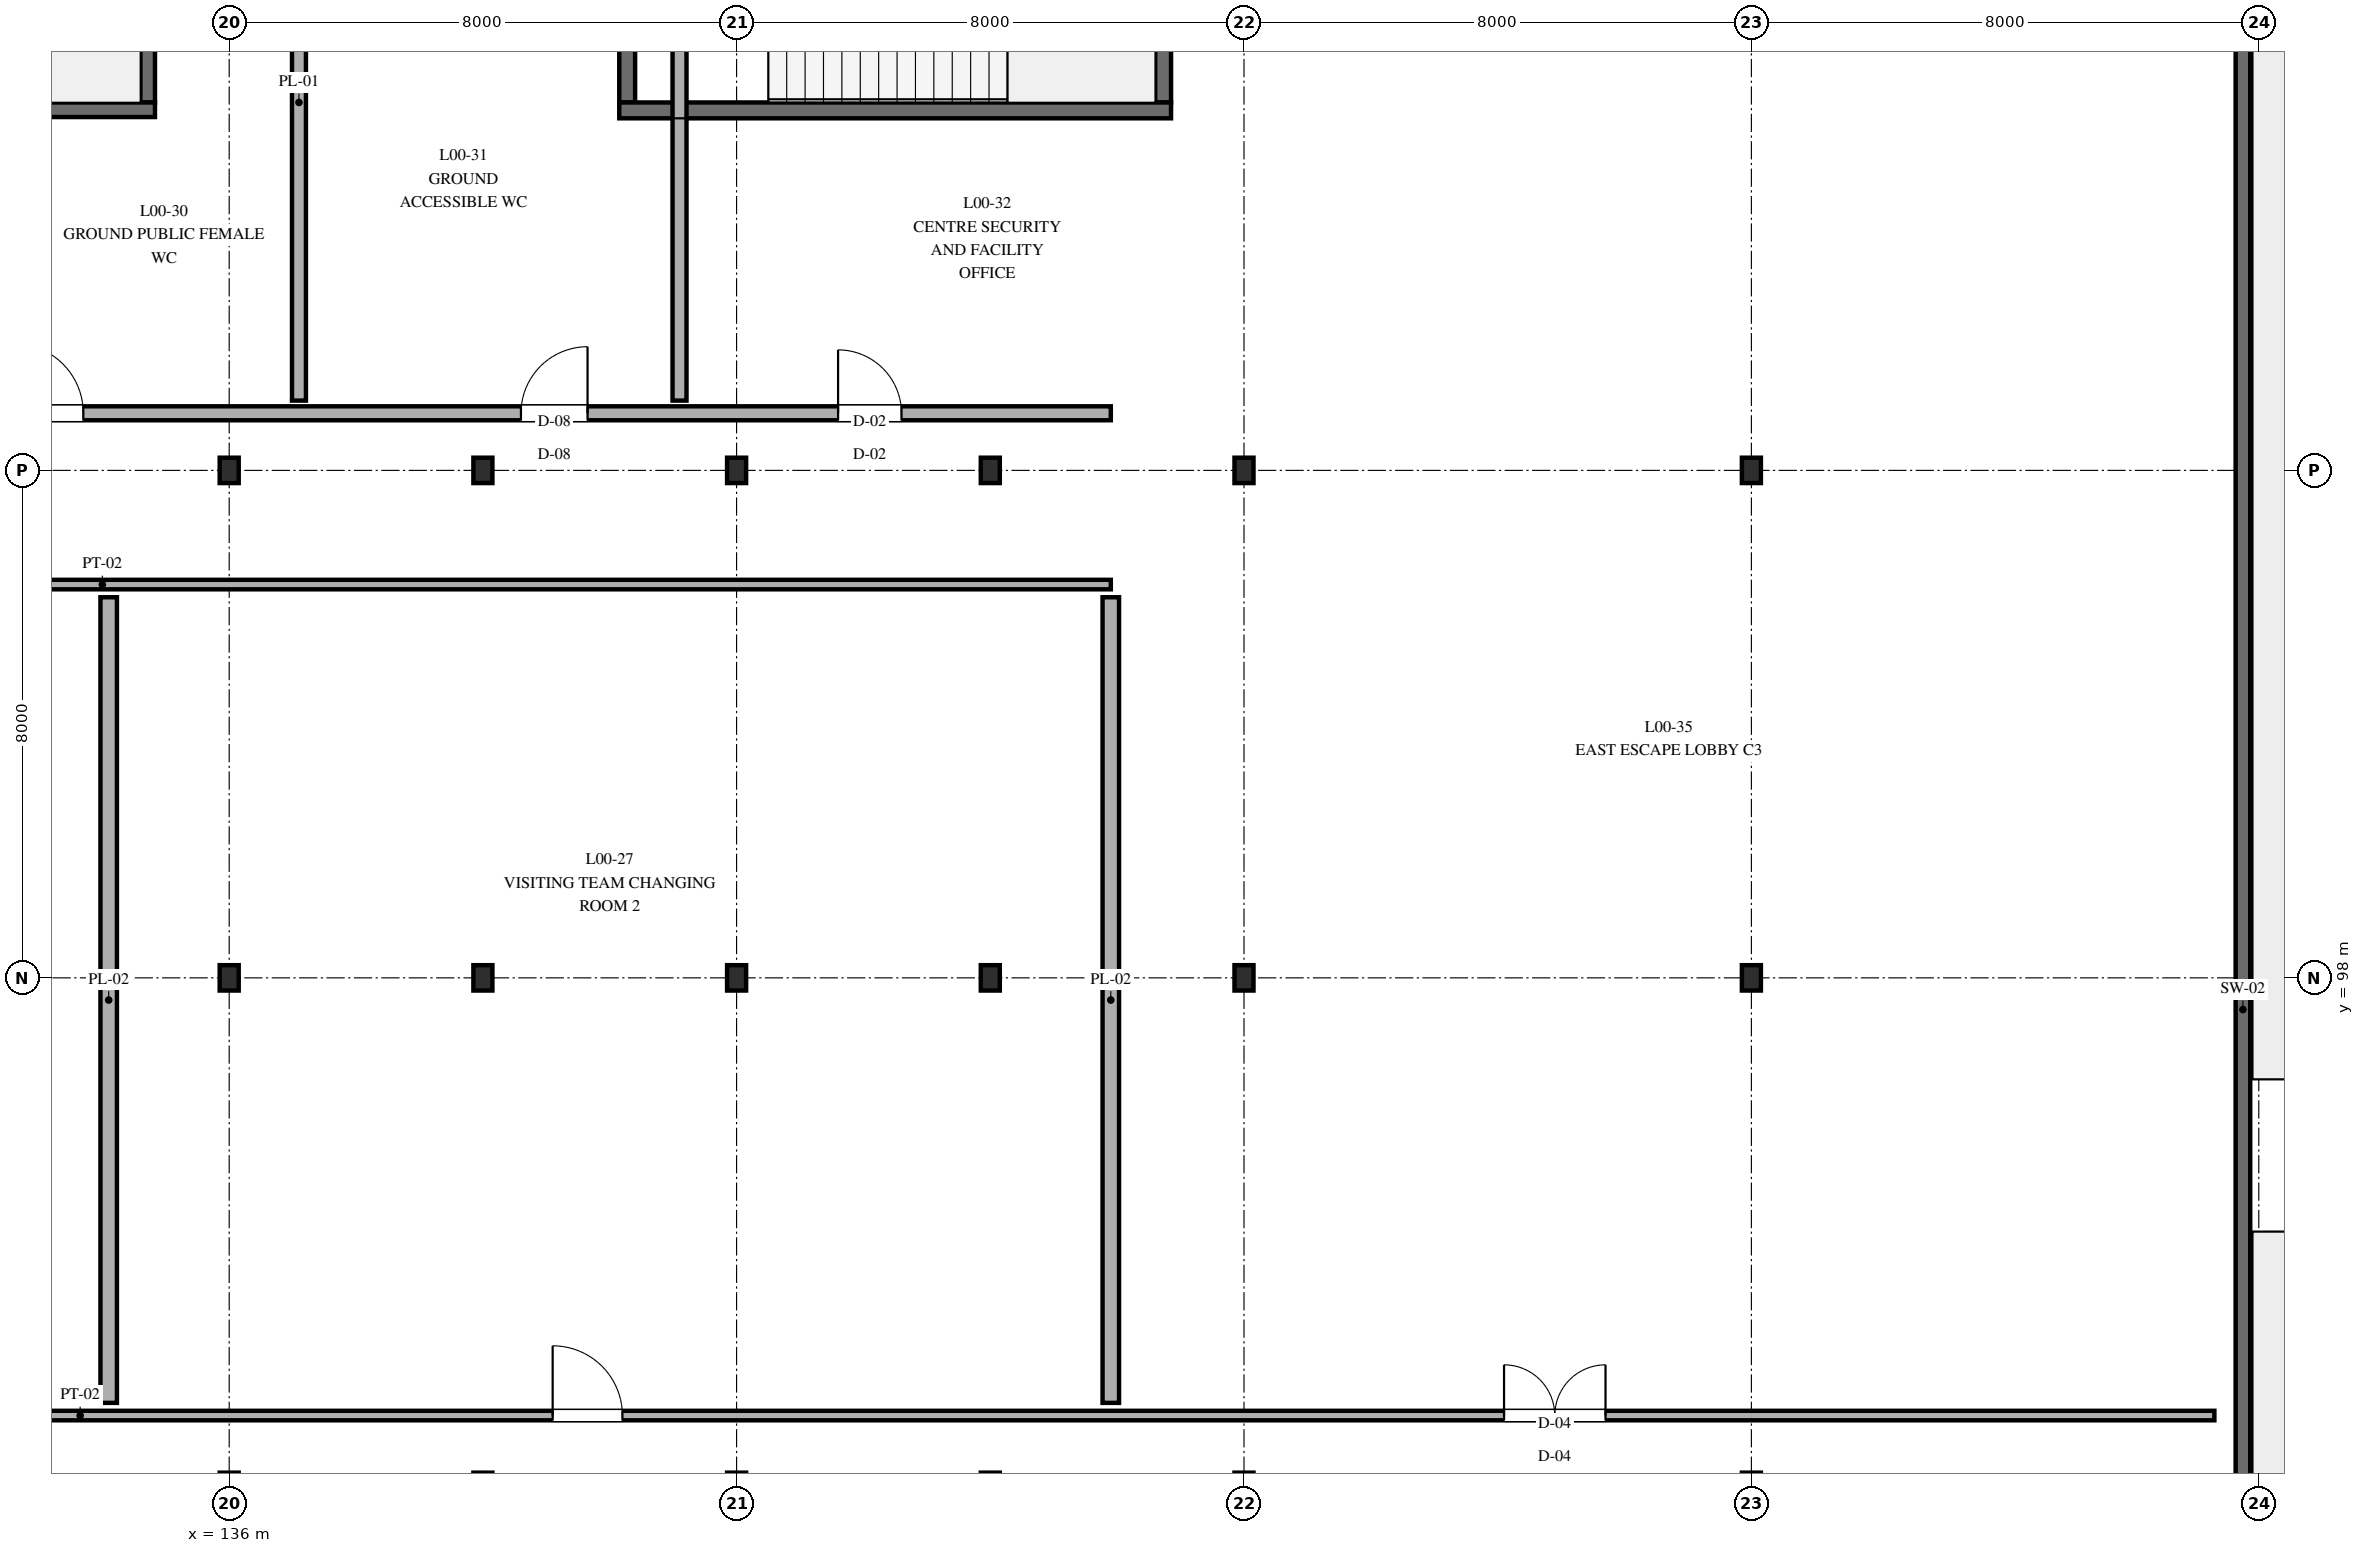
"""IFC4 building model, lengths in metres.
Left out: names, types, materials, properties, quantities, classifications, styles, units other than length and angle.
Written with IfcOpenShell. Run it as: python <this file> out.ifc"""

import sys

from ifc_helpers import new_model, si_unit, direction, frame, frame_2d, origin, origin_2d, place, context, subcontext, project, spatial, rectangle, i_section, extrude, element, fill, save


model = new_model("IFC4")
c1 = context("Model", 3, precision=1e-05, world=origin(), true_north=direction((0.0, 1.0)))
c2 = subcontext(c1, "Body", "Model", "MODEL_VIEW")
j1 = project(units=[si_unit("LENGTHUNIT", "METRE"), si_unit("PLANEANGLEUNIT", "RADIAN")], contexts=[c1])
p1 = place(None, origin())
s1 = spatial("IfcSite", under=j1, at=p1, CompositionType="ELEMENT")
p2 = place(p1, origin())
s2 = spatial("IfcBuilding", under=s1, at=p2, CompositionType="ELEMENT")
p3 = place(p2, origin())
s3 = spatial("IfcBuildingStorey", under=s2, at=p3, CompositionType="ELEMENT", Elevation=0.0)
for number, where, z_axis, x_axis in (
    (1, (136.0, 98.0, 0.0), (0.0, 0.0, 1.0), (1.0, 0.0, 0.0)),
    (2, (136.0, 106.0, 0.0), (0.0, 0.0, 1.0), (1.0, 0.0, 0.0)),
    (3, (140.0, 98.0, 0.0), (0.0, 0.0, 1.0), (1.0, 0.0, 0.0)),
    (4, (140.0, 106.0, 0.0), (0.0, 0.0, 1.0), (1.0, 0.0, 0.0)),
    (5, (144.0, 98.0, 0.0), (0.0, 0.0, 1.0), (1.0, 0.0, 0.0)),
    (6, (144.0, 106.0, 0.0), (0.0, 0.0, 1.0), (1.0, 0.0, 0.0)),
    (7, (148.0, 98.0, 0.0), (0.0, 0.0, 1.0), (1.0, 0.0, 0.0)),
    (8, (148.0, 106.0, 0.0), (0.0, 0.0, 1.0), (1.0, 0.0, 0.0)),
    (9, (152.0, 98.0, 0.0), (0.0, 0.0, 1.0), (1.0, 0.0, 0.0)),
    (10, (152.0, 106.0, 0.0), (0.0, 0.0, 1.0), (1.0, 0.0, 0.0)),
    (11, (160.0, 98.0, 0.0), (0.0, 0.0, 1.0), (1.0, 0.0, 0.0)),
    (12, (160.0, 106.0, 0.0), (0.0, 0.0, 1.0), (1.0, 0.0, 0.0)),
):
    element("IfcColumn", number, at=place(p3, frame(where, z_axis=z_axis, x_axis=x_axis)), inside=s3, PredefinedType="COLUMN", context=c2, shape_type="SweptSolid", body=[
        extrude(i_section(OverallWidth=0.3, OverallDepth=0.4, WebThickness=0.013, FlangeThickness=0.024, FilletRadius=0.027, at=origin_2d()), origin(), (0.0, 0.0, 1.0), 4.8),
    ])
p4 = place(p3, frame((142.275, 111.8, 0.0), z_axis=(0.0, 0.0, 1.0), x_axis=(0.0, 1.0, 0.0)))
e13 = element("IfcWall", 13, at=p4, inside=s3, PredefinedType="SHEAR", context=c2, shape_type="SweptSolid", body=[
    extrude(rectangle(XDim=4.18, YDim=0.25, at=frame_2d((2.09, 0.0))), origin(), (0.0, 0.0, 1.0), 4.8),
])
p5 = place(p4, frame((1.365, 0.0, 0.0)))
e14 = element("IfcOpeningElement", 14, at=p5, cuts=e13, PredefinedType="OPENING", context=c2, shape_type="SweptSolid", body=[
    extrude(rectangle(XDim=1.45, YDim=2.2, at=frame_2d((0.725, 1.1))), frame((0.0, 0.135, 0.0), z_axis=(0.0, -1.0, 0.0), x_axis=(1.0, 0.0, 0.0)), (0.0, 0.0, 1.0), 0.27),
])
p6 = place(p3, frame((150.725, 115.98, 0.0), z_axis=(0.0, 0.0, 1.0), x_axis=(0.0, -1.0, 0.0)))
e15 = element("IfcWall", 15, at=p6, inside=s3, PredefinedType="SHEAR", context=c2, shape_type="SweptSolid", body=[
    extrude(rectangle(XDim=4.18, YDim=0.25, at=frame_2d((2.09, 0.0))), origin(), (0.0, 0.0, 1.0), 4.8),
])
p7 = place(p3, frame((142.15, 111.675, 0.0), z_axis=(0.0, 0.0, 1.0), x_axis=(1.0, 0.0, 0.0)))
e16 = element("IfcWall", 16, at=p7, inside=s3, PredefinedType="SHEAR", context=c2, shape_type="SweptSolid", body=[
    extrude(rectangle(XDim=8.7, YDim=0.25, at=frame_2d((4.35, 0.0))), origin(), (0.0, 0.0, 1.0), 4.8),
])
p8 = place(p3, frame((134.715, 116.1, 0.0), z_axis=(0.0, 0.0, 1.0), x_axis=(0.0, -1.0, 0.0)))
e17 = element("IfcWall", 17, at=p8, inside=s3, PredefinedType="SHEAR", context=c2, shape_type="SweptSolid", body=[
    extrude(rectangle(XDim=4.3, YDim=0.23, at=frame_2d((2.15, 0.0))), origin(), (0.0, 0.0, 1.0), 4.8),
])
p9 = place(p3, frame((125.97, 111.685, 0.0), z_axis=(0.0, 0.0, 1.0), x_axis=(1.0, 0.0, 0.0)))
e18 = element("IfcWall", 18, at=p9, inside=s3, PredefinedType="SHEAR", context=c2, shape_type="SweptSolid", body=[
    extrude(rectangle(XDim=8.86, YDim=0.23, at=frame_2d((4.43, 0.0))), origin(), (0.0, 0.0, 1.0), 4.8),
])
p10 = place(p3, frame((167.75, 73.0, 0.0), z_axis=(0.0, 0.0, 1.0), x_axis=(0.0, 1.0, 0.0)))
e19 = element("IfcWall", 19, at=p10, inside=s3, PredefinedType="SHEAR", context=c2, shape_type="SweptSolid", body=[
    extrude(rectangle(XDim=43.5, YDim=0.23, at=frame_2d((21.75, 0.0))), origin(), (0.0, 0.0, 1.0), 4.58),
])
p11 = place(p3, frame((118.1, 91.1, 0.0), z_axis=(0.0, 0.0, 1.0), x_axis=(1.0, 0.0, 0.0)))
e20 = element("IfcWall", 20, at=p11, inside=s3, PredefinedType="PARTITIONING", context=c2, shape_type="SweptSolid", body=[
    extrude(rectangle(XDim=49.2, YDim=0.15, at=frame_2d((24.6, 0.0))), origin(), (0.0, 0.0, 1.0), 4.05),
])
p12 = place(p11, frame((7.0, 0.0, 0.0)))
e21 = element("IfcOpeningElement", 21, at=p12, cuts=e20, PredefinedType="OPENING", context=c2, shape_type="SweptSolid", body=[
    extrude(rectangle(XDim=1.1, YDim=2.2, at=frame_2d((0.55, 1.1))), frame((0.0, 0.085, 0.0), z_axis=(0.0, -1.0, 0.0), x_axis=(1.0, 0.0, 0.0)), (0.0, 0.0, 1.0), 0.17),
])
p13 = place(p11, frame((23.0, 0.0, 0.0)))
e22 = element("IfcOpeningElement", 22, at=p13, cuts=e20, PredefinedType="OPENING", context=c2, shape_type="SweptSolid", body=[
    extrude(rectangle(XDim=1.1, YDim=2.2, at=frame_2d((0.55, 1.1))), frame((0.0, 0.085, 0.0), z_axis=(0.0, -1.0, 0.0), x_axis=(1.0, 0.0, 0.0)), (0.0, 0.0, 1.0), 0.17),
])
p14 = place(p11, frame((38.0, 0.0, 0.0)))
e23 = element("IfcOpeningElement", 23, at=p14, cuts=e20, PredefinedType="OPENING", context=c2, shape_type="SweptSolid", body=[
    extrude(rectangle(XDim=1.6, YDim=2.2, at=frame_2d((0.8, 1.1))), frame((0.0, 0.085, 0.0), z_axis=(0.0, -1.0, 0.0), x_axis=(1.0, 0.0, 0.0)), (0.0, 0.0, 1.0), 0.17),
])
p15 = place(p3, frame((121.1, 106.9, 0.0), z_axis=(0.0, 0.0, 1.0), x_axis=(1.0, 0.0, 0.0)))
e24 = element("IfcWall", 24, at=p15, inside=s3, PredefinedType="PLUMBINGWALL", context=c2, shape_type="SweptSolid", body=[
    extrude(rectangle(XDim=28.8, YDim=0.22, at=frame_2d((14.4, 0.0))), origin(), (0.0, 0.0, 1.0), 4.05),
])
p16 = place(p15, frame((3.5, 0.0, 0.0)))
e25 = element("IfcOpeningElement", 25, at=p16, cuts=e24, PredefinedType="OPENING", context=c2, shape_type="SweptSolid", body=[
    extrude(rectangle(XDim=1.1, YDim=2.2, at=frame_2d((0.55, 1.1))), frame((0.0, 0.12, 0.0), z_axis=(0.0, -1.0, 0.0), x_axis=(1.0, 0.0, 0.0)), (0.0, 0.0, 1.0), 0.24),
])
p17 = place(p15, frame((11.5, 0.0, 0.0)))
e26 = element("IfcOpeningElement", 26, at=p17, cuts=e24, PredefinedType="OPENING", context=c2, shape_type="SweptSolid", body=[
    extrude(rectangle(XDim=1.1, YDim=2.2, at=frame_2d((0.55, 1.1))), frame((0.0, 0.12, 0.0), z_axis=(0.0, -1.0, 0.0), x_axis=(1.0, 0.0, 0.0)), (0.0, 0.0, 1.0), 0.24),
])
p18 = place(p15, frame((19.5, 0.0, 0.0)))
e27 = element("IfcOpeningElement", 27, at=p18, cuts=e24, PredefinedType="OPENING", context=c2, shape_type="SweptSolid", body=[
    extrude(rectangle(XDim=1.05, YDim=2.15, at=frame_2d((0.525, 1.075))), frame((0.0, 0.12, 0.0), z_axis=(0.0, -1.0, 0.0), x_axis=(1.0, 0.0, 0.0)), (0.0, 0.0, 1.0), 0.24),
])
p19 = place(p15, frame((24.5, 0.0, 0.0)))
e28 = element("IfcOpeningElement", 28, at=p19, cuts=e24, PredefinedType="OPENING", context=c2, shape_type="SweptSolid", body=[
    extrude(rectangle(XDim=1.0, YDim=2.15, at=frame_2d((0.5, 1.075))), frame((0.0, 0.12, 0.0), z_axis=(0.0, -1.0, 0.0), x_axis=(1.0, 0.0, 0.0)), (0.0, 0.0, 1.0), 0.24),
])
p20 = place(p3, frame((118.1, 104.2, 0.0), z_axis=(0.0, 0.0, 1.0), x_axis=(1.0, 0.0, 0.0)))
e29 = element("IfcWall", 29, at=p20, inside=s3, PredefinedType="PARTITIONING", context=c2, shape_type="SweptSolid", body=[
    extrude(rectangle(XDim=31.8, YDim=0.15, at=frame_2d((15.9, 0.0))), origin(), (0.0, 0.0, 1.0), 4.05),
])
for number, where, z_axis, x_axis in (
    (30, (137.1, 107.1, 0.0), (0.0, 0.0, 1.0), (0.0, 1.0, 0.0)),
    (31, (143.1, 107.1, 0.0), (0.0, 0.0, 1.0), (0.0, 1.0, 0.0)),
):
    element("IfcWall", number, at=place(p3, frame(where, z_axis=z_axis, x_axis=x_axis)), inside=s3, PredefinedType="PLUMBINGWALL", context=c2, shape_type="SweptSolid", body=[
        extrude(rectangle(XDim=9.4, YDim=0.22, at=frame_2d((4.7, 0.0))), origin(), (0.0, 0.0, 1.0), 4.05),
    ])
for number, where, z_axis, x_axis in (
    (32, (134.1, 91.3, 0.0), (0.0, 0.0, 1.0), (0.0, 1.0, 0.0)),
    (33, (149.9, 91.3, 0.0), (0.0, 0.0, 1.0), (0.0, 1.0, 0.0)),
):
    element("IfcWall", number, at=place(p3, frame(where, z_axis=z_axis, x_axis=x_axis)), inside=s3, PredefinedType="PLUMBINGWALL", context=c2, shape_type="SweptSolid", body=[
        extrude(rectangle(XDim=12.7, YDim=0.26, at=frame_2d((6.35, 0.0))), origin(), (0.0, 0.0, 1.0), 4.05),
    ])
p21 = place(p13, origin())
e34 = element("IfcDoor", 34, at=p21, inside=s3, OperationType="SINGLE_SWING_LEFT", PredefinedType="DOOR", context=c2, shape_type="SweptSolid", body=[
    extrude(rectangle(XDim=1.1, YDim=2.2, at=frame_2d((0.55, 1.1))), frame((0.0, 0.025, 0.0), z_axis=(0.0, -1.0, 0.0), x_axis=(1.0, 0.0, 0.0)), (0.0, 0.0, 1.0), 0.05),
])
fill(e22, e34)
p22 = place(p14, origin())
e35 = element("IfcDoor", 35, at=p22, inside=s3, OperationType="DOUBLE_DOOR_SINGLE_SWING", PredefinedType="DOOR", context=c2, shape_type="SweptSolid", body=[
    extrude(rectangle(XDim=1.6, YDim=2.2, at=frame_2d((0.8, 1.1))), frame((0.0, 0.025, 0.0), z_axis=(0.0, -1.0, 0.0), x_axis=(1.0, 0.0, 0.0)), (0.0, 0.0, 1.0), 0.05),
])
fill(e23, e35)
p23 = place(p17, origin())
e36 = element("IfcDoor", 36, at=p23, inside=s3, OperationType="SINGLE_SWING_LEFT", PredefinedType="DOOR", context=c2, shape_type="SweptSolid", body=[
    extrude(rectangle(XDim=1.1, YDim=2.2, at=frame_2d((0.55, 1.1))), frame((0.0, 0.025, 0.0), z_axis=(0.0, -1.0, 0.0), x_axis=(1.0, 0.0, 0.0)), (0.0, 0.0, 1.0), 0.05),
])
fill(e26, e36)
p24 = place(p18, origin())
e37 = element("IfcDoor", 37, at=p24, inside=s3, OperationType="SINGLE_SWING_RIGHT", PredefinedType="DOOR", context=c2, shape_type="SweptSolid", body=[
    extrude(rectangle(XDim=1.05, YDim=2.15, at=frame_2d((0.525, 1.075))), frame((0.0, 0.025, 0.0), z_axis=(0.0, -1.0, 0.0), x_axis=(1.0, 0.0, 0.0)), (0.0, 0.0, 1.0), 0.05),
])
fill(e27, e37)
p25 = place(p19, origin())
e38 = element("IfcDoor", 38, at=p25, inside=s3, OperationType="SINGLE_SWING_LEFT", PredefinedType="DOOR", context=c2, shape_type="SweptSolid", body=[
    extrude(rectangle(XDim=1.0, YDim=2.15, at=frame_2d((0.5, 1.075))), frame((0.0, 0.025, 0.0), z_axis=(0.0, -1.0, 0.0), x_axis=(1.0, 0.0, 0.0)), (0.0, 0.0, 1.0), 0.05),
])
fill(e28, e38)
save(model, sys.argv[1])
